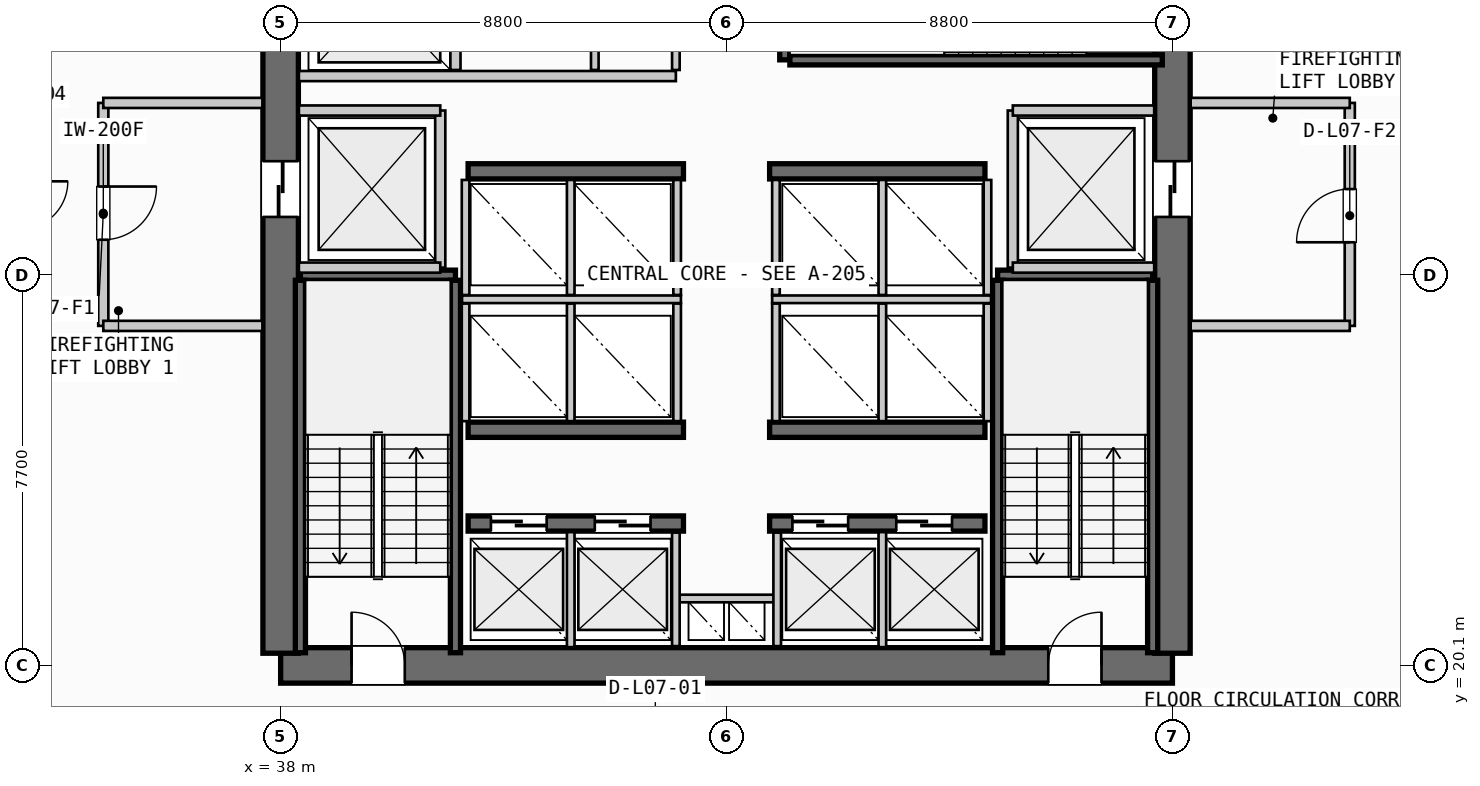
"""IFC4 building model, lengths in metres.
Left out: names, types, materials, properties, quantities, classifications, styles, units other than length and angle.
Written with IfcOpenShell. Run it as: python <this file> out.ifc"""

import sys

from ifc_helpers import new_model, si_unit, direction, frame, frame_2d, origin, place, context, subcontext, project, spatial, rectangle, extrude, source, transform, mapped, element, fill, save


model = new_model("IFC4")
c1 = context("Model", 3, precision=1e-05, world=origin(), true_north=direction((0.0, 1.0)))
c2 = subcontext(c1, "Body", "Model", "MODEL_VIEW")
j1 = project(units=[si_unit("LENGTHUNIT", "METRE"), si_unit("PLANEANGLEUNIT", "RADIAN")], contexts=[c1])
p1 = place(None, origin())
s1 = spatial("IfcSite", under=j1, at=p1, CompositionType="ELEMENT")
p2 = place(p1, origin())
s2 = spatial("IfcBuilding", under=s1, at=p2, CompositionType="ELEMENT")
p3 = place(p2, frame((0.0, 0.0, 33.4)))
s3 = spatial("IfcBuildingStorey", under=s2, at=p3, CompositionType="ELEMENT", Elevation=33.4)
p4 = place(p3, frame((38.0, 20.1, 0.0), z_axis=(0.0, 0.0, 1.0), x_axis=(1.0, 0.0, 0.0)))
e1 = element("IfcWall", 1, at=p4, inside=s3, PredefinedType="SHEAR", context=c2, shape_type="SweptSolid", body=[
    extrude(rectangle(XDim=17.6, YDim=0.7, at=frame_2d((8.8, 0.0))), origin(), (0.0, 0.0, 1.0), 3.55),
])
p5 = place(p4, frame((1.4, 0.0, 0.0)))
e2 = element("IfcOpeningElement", 2, at=p5, cuts=e1, PredefinedType="OPENING", context=c2, shape_type="SweptSolid", body=[
    extrude(rectangle(XDim=1.05, YDim=2.15, at=frame_2d((0.525, 1.075))), frame((0.0, 0.36, 0.0), z_axis=(0.0, -1.0, 0.0), x_axis=(1.0, 0.0, 0.0)), (0.0, 0.0, 1.0), 0.72),
])
p6 = place(p4, frame((15.15, 0.0, 0.0)))
e3 = element("IfcOpeningElement", 3, at=p6, cuts=e1, PredefinedType="OPENING", context=c2, shape_type="SweptSolid", body=[
    extrude(rectangle(XDim=1.05, YDim=2.15, at=frame_2d((0.525, 1.075))), frame((0.0, 0.36, 0.0), z_axis=(0.0, -1.0, 0.0), x_axis=(1.0, 0.0, 0.0)), (0.0, 0.0, 1.0), 0.72),
])
p7 = place(p3, frame((38.0, 35.26, 0.0), z_axis=(0.0, 0.0, 1.0), x_axis=(0.0, -1.0, 0.0)))
e4 = element("IfcWall", 4, at=p7, inside=s3, PredefinedType="SHEAR", context=c2, shape_type="SweptSolid", body=[
    extrude(rectangle(XDim=14.92, YDim=0.7, at=frame_2d((7.46, 0.0))), origin(), (0.0, 0.0, 1.0), 3.55),
])
p8 = place(p7, frame((5.21, 0.0, 0.0)))
e5 = element("IfcOpeningElement", 5, at=p8, cuts=e4, PredefinedType="OPENING", context=c2, shape_type="SweptSolid", body=[
    extrude(rectangle(XDim=1.1, YDim=2.2, at=frame_2d((0.55, 1.1))), frame((0.0, 0.36, 0.0), z_axis=(0.0, -1.0, 0.0), x_axis=(1.0, 0.0, 0.0)), (0.0, 0.0, 1.0), 0.72),
])
p9 = place(p3, frame((55.6, 20.34, 0.0), z_axis=(0.0, 0.0, 1.0), x_axis=(0.0, 1.0, 0.0)))
e6 = element("IfcWall", 6, at=p9, inside=s3, PredefinedType="SHEAR", context=c2, shape_type="SweptSolid", body=[
    extrude(rectangle(XDim=14.92, YDim=0.7, at=frame_2d((7.46, 0.0))), origin(), (0.0, 0.0, 1.0), 3.55),
])
p10 = place(p9, frame((12.71, 0.0, 0.0)))
e7 = element("IfcOpeningElement", 7, at=p10, cuts=e6, PredefinedType="OPENING", context=c2, shape_type="SweptSolid", body=[
    extrude(rectangle(XDim=1.05, YDim=2.15, at=frame_2d((0.525, 1.075))), frame((0.0, 0.36, 0.0), z_axis=(0.0, -1.0, 0.0), x_axis=(1.0, 0.0, 0.0)), (0.0, 0.0, 1.0), 0.72),
])
p11 = place(p9, frame((8.61, 0.0, 0.0)))
e8 = element("IfcOpeningElement", 8, at=p11, cuts=e6, PredefinedType="OPENING", context=c2, shape_type="SweptSolid", body=[
    extrude(rectangle(XDim=1.1, YDim=2.2, at=frame_2d((0.55, 1.1))), frame((0.0, 0.36, 0.0), z_axis=(0.0, -1.0, 0.0), x_axis=(1.0, 0.0, 0.0)), (0.0, 0.0, 1.0), 0.72),
])
p12 = place(p3, frame((41.7, 22.9, 0.0), z_axis=(0.0, 0.0, 1.0), x_axis=(1.0, 0.0, 0.0)))
e9 = element("IfcWall", 9, at=p12, inside=s3, PredefinedType="SHEAR", context=c2, shape_type="SweptSolid", body=[
    extrude(rectangle(XDim=4.25, YDim=0.3, at=frame_2d((2.125, 0.0))), origin(), (0.0, 0.0, 1.0), 3.55),
])
p13 = place(p12, frame((0.45, 0.0, 0.0)))
e10 = element("IfcOpeningElement", 10, at=p13, cuts=e9, PredefinedType="OPENING", context=c2, shape_type="SweptSolid", body=[
    extrude(rectangle(XDim=1.1, YDim=2.2, at=frame_2d((0.55, 1.1))), frame((0.0, 0.16, 0.0), z_axis=(0.0, -1.0, 0.0), x_axis=(1.0, 0.0, 0.0)), (0.0, 0.0, 1.0), 0.32),
])
p14 = place(p12, frame((2.5, 0.0, 0.0)))
e11 = element("IfcOpeningElement", 11, at=p14, cuts=e9, PredefinedType="OPENING", context=c2, shape_type="SweptSolid", body=[
    extrude(rectangle(XDim=1.1, YDim=2.2, at=frame_2d((0.55, 1.1))), frame((0.0, 0.16, 0.0), z_axis=(0.0, -1.0, 0.0), x_axis=(1.0, 0.0, 0.0)), (0.0, 0.0, 1.0), 0.32),
])
p15 = place(p3, frame((47.65, 22.9, 0.0), z_axis=(0.0, 0.0, 1.0), x_axis=(1.0, 0.0, 0.0)))
e12 = element("IfcWall", 12, at=p15, inside=s3, PredefinedType="SHEAR", context=c2, shape_type="SweptSolid", body=[
    extrude(rectangle(XDim=4.25, YDim=0.3, at=frame_2d((2.125, 0.0))), origin(), (0.0, 0.0, 1.0), 3.55),
])
p16 = place(p15, frame((0.45, 0.0, 0.0)))
e13 = element("IfcOpeningElement", 13, at=p16, cuts=e12, PredefinedType="OPENING", context=c2, shape_type="SweptSolid", body=[
    extrude(rectangle(XDim=1.1, YDim=2.2, at=frame_2d((0.55, 1.1))), frame((0.0, 0.16, 0.0), z_axis=(0.0, -1.0, 0.0), x_axis=(1.0, 0.0, 0.0)), (0.0, 0.0, 1.0), 0.32),
])
p17 = place(p15, frame((2.5, 0.0, 0.0)))
e14 = element("IfcOpeningElement", 14, at=p17, cuts=e12, PredefinedType="OPENING", context=c2, shape_type="SweptSolid", body=[
    extrude(rectangle(XDim=1.1, YDim=2.2, at=frame_2d((0.55, 1.1))), frame((0.0, 0.16, 0.0), z_axis=(0.0, -1.0, 0.0), x_axis=(1.0, 0.0, 0.0)), (0.0, 0.0, 1.0), 0.32),
])
for number, where, z_axis, x_axis in (
    (15, (41.7, 24.75, 0.0), (0.0, 0.0, 1.0), (1.0, 0.0, 0.0)),
    (16, (47.65, 24.75, 0.0), (0.0, 0.0, 1.0), (1.0, 0.0, 0.0)),
    (17, (41.7, 29.85, 0.0), (0.0, 0.0, 1.0), (1.0, 0.0, 0.0)),
    (18, (47.65, 29.85, 0.0), (0.0, 0.0, 1.0), (1.0, 0.0, 0.0)),
):
    element("IfcWall", number, at=place(p3, frame(where, z_axis=z_axis, x_axis=x_axis)), inside=s3, PredefinedType="SHEAR", context=c2, shape_type="SweptSolid", body=[
        extrude(rectangle(XDim=4.25, YDim=0.3, at=frame_2d((2.125, 0.0))), origin(), (0.0, 0.0, 1.0), 3.55),
    ])
p18 = place(p3, frame((38.39, 27.8, 0.0), z_axis=(0.0, 0.0, 1.0), x_axis=(1.0, 0.0, 0.0)))
e19 = element("IfcWall", 19, at=p18, inside=s3, PredefinedType="SHEAR", context=c2, shape_type="SweptSolid", body=[
    extrude(rectangle(XDim=3.06, YDim=0.2, at=frame_2d((1.53, 0.0))), origin(), (0.0, 0.0, 1.0), 3.55),
])
for number, where, z_axis, x_axis in (
    (20, (41.45, 27.7, 0.0), (0.0, 0.0, 1.0), (0.0, -1.0, 0.0)),
    (21, (38.39, 20.35, 0.0), (0.0, 0.0, 1.0), (0.0, 1.0, 0.0)),
):
    element("IfcWall", number, at=place(p3, frame(where, z_axis=z_axis, x_axis=x_axis)), inside=s3, PredefinedType="SHEAR", context=c2, shape_type="SweptSolid", body=[
        extrude(rectangle(XDim=7.35, YDim=0.2, at=frame_2d((3.675, 0.0))), origin(), (0.0, 0.0, 1.0), 3.55),
    ])
p19 = place(p3, frame((52.15, 27.8, 0.0), z_axis=(0.0, 0.0, 1.0), x_axis=(1.0, 0.0, 0.0)))
e22 = element("IfcWall", 22, at=p19, inside=s3, PredefinedType="SHEAR", context=c2, shape_type="SweptSolid", body=[
    extrude(rectangle(XDim=3.06, YDim=0.2, at=frame_2d((1.53, 0.0))), origin(), (0.0, 0.0, 1.0), 3.55),
])
for number, where, z_axis, x_axis in (
    (23, (55.21, 27.7, 0.0), (0.0, 0.0, 1.0), (0.0, -1.0, 0.0)),
    (24, (52.15, 20.35, 0.0), (0.0, 0.0, 1.0), (0.0, 1.0, 0.0)),
):
    element("IfcWall", number, at=place(p3, frame(where, z_axis=z_axis, x_axis=x_axis)), inside=s3, PredefinedType="SHEAR", context=c2, shape_type="SweptSolid", body=[
        extrude(rectangle(XDim=7.35, YDim=0.2, at=frame_2d((3.675, 0.0))), origin(), (0.0, 0.0, 1.0), 3.55),
    ])
p20 = place(p3, frame((47.95, 32.05, 0.0), z_axis=(0.0, 0.0, 1.0), x_axis=(0.0, 1.0, 0.0)))
e25 = element("IfcWall", 25, at=p20, inside=s3, PredefinedType="SHEAR", context=c2, shape_type="SweptSolid", body=[
    extrude(rectangle(XDim=3.06, YDim=0.2, at=frame_2d((1.53, 0.0))), origin(), (0.0, 0.0, 1.0), 3.55),
])
p21 = place(p3, frame((55.4, 32.05, 0.0), z_axis=(0.0, 0.0, 1.0), x_axis=(-1.0, 0.0, 0.0)))
e26 = element("IfcWall", 26, at=p21, inside=s3, PredefinedType="SHEAR", context=c2, shape_type="SweptSolid", body=[
    extrude(rectangle(XDim=7.35, YDim=0.2, at=frame_2d((3.675, 0.0))), origin(), (0.0, 0.0, 1.0), 3.55),
])
p22 = place(p3, frame((45.8, 21.42, 0.0), z_axis=(0.0, 0.0, 1.0), x_axis=(1.0, 0.0, 0.0)))
e27 = element("IfcWall", 27, at=p22, inside=s3, PredefinedType="PARTITIONING", context=c2, shape_type="SweptSolid", body=[
    extrude(rectangle(XDim=2.0, YDim=0.15, at=frame_2d((1.0, 0.0))), origin(), (0.0, 0.0, 1.0), 2.925),
])
for number, where, z_axis, x_axis in (
    (28, (45.8, 20.48, 0.0), (0.0, 0.0, 1.0), (0.0, 1.0, 0.0)),
    (29, (47.8, 20.48, 0.0), (0.0, 0.0, 1.0), (0.0, 1.0, 0.0)),
):
    element("IfcWall", number, at=place(p3, frame(where, z_axis=z_axis, x_axis=x_axis)), inside=s3, PredefinedType="PARTITIONING", context=c2, shape_type="SweptSolid", body=[
        extrude(rectangle(XDim=2.24, YDim=0.15, at=frame_2d((1.12, 0.0))), origin(), (0.0, 0.0, 1.0), 2.925),
    ])
p23 = place(p3, frame((41.15, 27.95, 0.0), z_axis=(0.0, 0.0, 1.0), x_axis=(0.0, 1.0, 0.0)))
e30 = element("IfcWall", 30, at=p23, inside=s3, PredefinedType="PARTITIONING", context=c2, shape_type="SweptSolid", body=[
    extrude(rectangle(XDim=3.1, YDim=0.2, at=frame_2d((1.55, 0.0))), origin(), (0.0, 0.0, 1.0), 2.925),
])
for number, where, z_axis, x_axis in (
    (31, (38.36, 27.95, 0.0), (0.0, 0.0, 1.0), (1.0, 0.0, 0.0)),
    (32, (38.36, 31.05, 0.0), (0.0, 0.0, 1.0), (1.0, 0.0, 0.0)),
):
    element("IfcWall", number, at=place(p3, frame(where, z_axis=z_axis, x_axis=x_axis)), inside=s3, PredefinedType="PARTITIONING", context=c2, shape_type="SweptSolid", body=[
        extrude(rectangle(XDim=2.79, YDim=0.2, at=frame_2d((1.395, 0.0))), origin(), (0.0, 0.0, 1.0), 2.925),
    ])
p24 = place(p3, frame((34.5, 31.2, 0.0), z_axis=(0.0, 0.0, 1.0), x_axis=(0.0, -1.0, 0.0)))
e33 = element("IfcWall", 33, at=p24, inside=s3, PredefinedType="PARTITIONING", context=c2, shape_type="SweptSolid", body=[
    extrude(rectangle(XDim=4.4, YDim=0.2, at=frame_2d((2.2, 0.0))), origin(), (0.0, 0.0, 1.0), 2.925),
])
p25 = place(p24, frame((1.65, 0.0, 0.0)))
e34 = element("IfcOpeningElement", 34, at=p25, cuts=e33, PredefinedType="OPENING", context=c2, shape_type="SweptSolid", body=[
    extrude(rectangle(XDim=1.05, YDim=2.15, at=frame_2d((0.525, 1.075))), frame((0.0, 0.11, 0.0), z_axis=(0.0, -1.0, 0.0), x_axis=(1.0, 0.0, 0.0)), (0.0, 0.0, 1.0), 0.22),
])
for number, where, z_axis, x_axis in (
    (35, (34.5, 26.8, 0.0), (0.0, 0.0, 1.0), (1.0, 0.0, 0.0)),
    (36, (34.5, 31.2, 0.0), (0.0, 0.0, 1.0), (1.0, 0.0, 0.0)),
):
    element("IfcWall", number, at=place(p3, frame(where, z_axis=z_axis, x_axis=x_axis)), inside=s3, PredefinedType="PARTITIONING", context=c2, shape_type="SweptSolid", body=[
        extrude(rectangle(XDim=3.14, YDim=0.2, at=frame_2d((1.57, 0.0))), origin(), (0.0, 0.0, 1.0), 2.925),
    ])
p26 = place(p3, frame((52.45, 27.95, 0.0), z_axis=(0.0, 0.0, 1.0), x_axis=(0.0, 1.0, 0.0)))
e37 = element("IfcWall", 37, at=p26, inside=s3, PredefinedType="PARTITIONING", context=c2, shape_type="SweptSolid", body=[
    extrude(rectangle(XDim=3.1, YDim=0.2, at=frame_2d((1.55, 0.0))), origin(), (0.0, 0.0, 1.0), 2.925),
])
for number, where, z_axis, x_axis in (
    (38, (52.45, 27.95, 0.0), (0.0, 0.0, 1.0), (1.0, 0.0, 0.0)),
    (39, (52.45, 31.05, 0.0), (0.0, 0.0, 1.0), (1.0, 0.0, 0.0)),
):
    element("IfcWall", number, at=place(p3, frame(where, z_axis=z_axis, x_axis=x_axis)), inside=s3, PredefinedType="PARTITIONING", context=c2, shape_type="SweptSolid", body=[
        extrude(rectangle(XDim=2.79, YDim=0.2, at=frame_2d((1.395, 0.0))), origin(), (0.0, 0.0, 1.0), 2.925),
    ])
p27 = place(p3, frame((59.1, 26.8, 0.0), z_axis=(0.0, 0.0, 1.0), x_axis=(0.0, 1.0, 0.0)))
e40 = element("IfcWall", 40, at=p27, inside=s3, PredefinedType="PARTITIONING", context=c2, shape_type="SweptSolid", body=[
    extrude(rectangle(XDim=4.4, YDim=0.2, at=frame_2d((2.2, 0.0))), origin(), (0.0, 0.0, 1.0), 2.925),
])
p28 = place(p27, frame((1.65, 0.0, 0.0)))
e41 = element("IfcOpeningElement", 41, at=p28, cuts=e40, PredefinedType="OPENING", context=c2, shape_type="SweptSolid", body=[
    extrude(rectangle(XDim=1.05, YDim=2.15, at=frame_2d((0.525, 1.075))), frame((0.0, 0.11, 0.0), z_axis=(0.0, -1.0, 0.0), x_axis=(1.0, 0.0, 0.0)), (0.0, 0.0, 1.0), 0.22),
])
for number, where, z_axis, x_axis in (
    (42, (55.96, 26.8, 0.0), (0.0, 0.0, 1.0), (1.0, 0.0, 0.0)),
    (43, (55.96, 31.2, 0.0), (0.0, 0.0, 1.0), (1.0, 0.0, 0.0)),
):
    element("IfcWall", number, at=place(p3, frame(where, z_axis=z_axis, x_axis=x_axis)), inside=s3, PredefinedType="PARTITIONING", context=c2, shape_type="SweptSolid", body=[
        extrude(rectangle(XDim=3.14, YDim=0.2, at=frame_2d((1.57, 0.0))), origin(), (0.0, 0.0, 1.0), 2.925),
    ])
for number, where, z_axis, x_axis in (
    (44, (43.725, 20.46, 0.0), (0.0, 0.0, 1.0), (0.0, 1.0, 0.0)),
    (45, (49.875, 20.46, 0.0), (0.0, 0.0, 1.0), (0.0, 1.0, 0.0)),
):
    element("IfcWall", number, at=place(p3, frame(where, z_axis=z_axis, x_axis=x_axis)), inside=s3, PredefinedType="PARTITIONING", context=c2, shape_type="SweptSolid", body=[
        extrude(rectangle(XDim=2.27, YDim=0.15, at=frame_2d((1.135, 0.0))), origin(), (0.0, 0.0, 1.0), 2.925),
    ])
p29 = place(p3, frame((41.58, 27.325, 0.0), z_axis=(0.0, 0.0, 1.0), x_axis=(1.0, 0.0, 0.0)))
e46 = element("IfcWall", 46, at=p29, inside=s3, PredefinedType="PARTITIONING", context=c2, shape_type="SweptSolid", body=[
    extrude(rectangle(XDim=4.32, YDim=0.15, at=frame_2d((2.16, 0.0))), origin(), (0.0, 0.0, 1.0), 2.925),
])
p30 = place(p3, frame((47.7, 27.325, 0.0), z_axis=(0.0, 0.0, 1.0), x_axis=(1.0, 0.0, 0.0)))
e47 = element("IfcWall", 47, at=p30, inside=s3, PredefinedType="PARTITIONING", context=c2, shape_type="SweptSolid", body=[
    extrude(rectangle(XDim=4.32, YDim=0.15, at=frame_2d((2.16, 0.0))), origin(), (0.0, 0.0, 1.0), 2.925),
])
for number, where, z_axis, x_axis in (
    (48, (41.65, 24.92, 0.0), (0.0, 0.0, 1.0), (0.0, 1.0, 0.0)),
    (49, (43.725, 24.92, 0.0), (0.0, 0.0, 1.0), (0.0, 1.0, 0.0)),
    (50, (45.825, 24.92, 0.0), (0.0, 0.0, 1.0), (0.0, 1.0, 0.0)),
    (51, (47.775, 24.92, 0.0), (0.0, 0.0, 1.0), (0.0, 1.0, 0.0)),
    (52, (49.875, 24.92, 0.0), (0.0, 0.0, 1.0), (0.0, 1.0, 0.0)),
    (53, (51.95, 24.92, 0.0), (0.0, 0.0, 1.0), (0.0, 1.0, 0.0)),
):
    element("IfcWall", number, at=place(p3, frame(where, z_axis=z_axis, x_axis=x_axis)), inside=s3, PredefinedType="PARTITIONING", context=c2, shape_type="SweptSolid", body=[
        extrude(rectangle(XDim=2.32, YDim=0.15, at=frame_2d((1.16, 0.0))), origin(), (0.0, 0.0, 1.0), 2.925),
    ])
for number, where, z_axis, x_axis in (
    (54, (41.65, 27.41, 0.0), (0.0, 0.0, 1.0), (0.0, 1.0, 0.0)),
    (55, (43.725, 27.41, 0.0), (0.0, 0.0, 1.0), (0.0, 1.0, 0.0)),
    (56, (45.825, 27.41, 0.0), (0.0, 0.0, 1.0), (0.0, 1.0, 0.0)),
    (57, (47.775, 27.41, 0.0), (0.0, 0.0, 1.0), (0.0, 1.0, 0.0)),
    (58, (49.875, 27.41, 0.0), (0.0, 0.0, 1.0), (0.0, 1.0, 0.0)),
    (59, (51.95, 27.41, 0.0), (0.0, 0.0, 1.0), (0.0, 1.0, 0.0)),
):
    element("IfcWall", number, at=place(p3, frame(where, z_axis=z_axis, x_axis=x_axis)), inside=s3, PredefinedType="PARTITIONING", context=c2, shape_type="SweptSolid", body=[
        extrude(rectangle(XDim=2.27, YDim=0.15, at=frame_2d((1.135, 0.0))), origin(), (0.0, 0.0, 1.0), 2.925),
    ])
p31 = place(p3, frame((41.45, 31.85, 0.0), z_axis=(0.0, 0.0, 1.0), x_axis=(0.0, 1.0, 0.0)))
e60 = element("IfcWall", 60, at=p31, inside=s3, PredefinedType="PARTITIONING", context=c2, shape_type="SweptSolid", body=[
    extrude(rectangle(XDim=3.29, YDim=0.2, at=frame_2d((1.645, 0.0))), origin(), (0.0, 0.0, 1.0), 2.925),
])
p32 = place(p3, frame((38.36, 31.73, 0.0), z_axis=(0.0, 0.0, 1.0), x_axis=(1.0, 0.0, 0.0)))
e61 = element("IfcWall", 61, at=p32, inside=s3, PredefinedType="PARTITIONING", context=c2, shape_type="SweptSolid", body=[
    extrude(rectangle(XDim=7.44, YDim=0.2, at=frame_2d((3.72, 0.0))), origin(), (0.0, 0.0, 1.0), 2.925),
])
p33 = place(p3, frame((45.8, 31.85, 0.0), z_axis=(0.0, 0.0, 1.0), x_axis=(0.0, 1.0, 0.0)))
e62 = element("IfcWall", 62, at=p33, inside=s3, PredefinedType="PARTITIONING", context=c2, shape_type="SweptSolid", body=[
    extrude(rectangle(XDim=3.29, YDim=0.15, at=frame_2d((1.645, 0.0))), origin(), (0.0, 0.0, 1.0), 2.925),
])
p34 = place(p3, frame((44.2, 31.85, 0.0), z_axis=(0.0, 0.0, 1.0), x_axis=(0.0, 1.0, 0.0)))
e63 = element("IfcWall", 63, at=p34, inside=s3, PredefinedType="PLUMBINGWALL", context=c2, shape_type="SweptSolid", body=[
    extrude(rectangle(XDim=3.29, YDim=0.15, at=frame_2d((1.645, 0.0))), origin(), (0.0, 0.0, 1.0), 2.925),
])
m1 = source(origin(), c2, "Body", "SweptSolid", [
    extrude(rectangle(XDim=1.05, YDim=2.15, at=frame_2d((0.525, 1.075))), frame((0.0, 0.025, 0.0), z_axis=(0.0, -1.0, 0.0), x_axis=(1.0, 0.0, 0.0)), (0.0, 0.0, 1.0), 0.05),
])
p35 = place(p5, origin())
e64 = element("IfcDoor", 64, at=p35, inside=s3, OperationType="SINGLE_SWING_LEFT", PredefinedType="DOOR", context=c2, shape_type="MappedRepresentation", body=[
    mapped(m1, transform((0.0, 0.0, 0.0), scale=1.0)),
])
fill(e2, e64)
p36 = place(p6, origin())
e65 = element("IfcDoor", 65, at=p36, inside=s3, OperationType="SINGLE_SWING_RIGHT", PredefinedType="DOOR", context=c2, shape_type="MappedRepresentation", body=[
    mapped(m1, transform((0.0, 0.0, 0.0), scale=1.0)),
])
fill(e3, e65)
m2 = source(origin(), c2, "Body", "SweptSolid", [
    extrude(rectangle(XDim=1.1, YDim=2.2, at=frame_2d((0.55, 1.1))), frame((0.0, 0.025, 0.0), z_axis=(0.0, -1.0, 0.0), x_axis=(1.0, 0.0, 0.0)), (0.0, 0.0, 1.0), 0.05),
])
p37 = place(p8, origin())
e66 = element("IfcDoor", 66, at=p37, inside=s3, OperationType="SLIDING_TO_LEFT", PredefinedType="DOOR", context=c2, shape_type="MappedRepresentation", body=[
    mapped(m2, transform((0.0, 0.0, 0.0), scale=1.0)),
])
fill(e5, e66)
p38 = place(p11, origin())
e67 = element("IfcDoor", 67, at=p38, inside=s3, OperationType="SLIDING_TO_RIGHT", PredefinedType="DOOR", context=c2, shape_type="MappedRepresentation", body=[
    mapped(m2, transform((0.0, 0.0, 0.0), scale=1.0)),
])
fill(e8, e67)
p39 = place(p13, origin())
e68 = element("IfcDoor", 68, at=p39, inside=s3, OperationType="SLIDING_TO_LEFT", PredefinedType="DOOR", context=c2, shape_type="MappedRepresentation", body=[
    mapped(m2, transform((0.0, 0.0, 0.0), scale=1.0)),
])
fill(e10, e68)
p40 = place(p14, origin())
e69 = element("IfcDoor", 69, at=p40, inside=s3, OperationType="SLIDING_TO_LEFT", PredefinedType="DOOR", context=c2, shape_type="MappedRepresentation", body=[
    mapped(m2, transform((0.0, 0.0, 0.0), scale=1.0)),
])
fill(e11, e69)
p41 = place(p16, origin())
e70 = element("IfcDoor", 70, at=p41, inside=s3, OperationType="SLIDING_TO_LEFT", PredefinedType="DOOR", context=c2, shape_type="MappedRepresentation", body=[
    mapped(m2, transform((0.0, 0.0, 0.0), scale=1.0)),
])
fill(e13, e70)
p42 = place(p17, origin())
e71 = element("IfcDoor", 71, at=p42, inside=s3, OperationType="SLIDING_TO_LEFT", PredefinedType="DOOR", context=c2, shape_type="MappedRepresentation", body=[
    mapped(m2, transform((0.0, 0.0, 0.0), scale=1.0)),
])
fill(e14, e71)
p43 = place(p25, origin())
e72 = element("IfcDoor", 72, at=p43, inside=s3, OperationType="SINGLE_SWING_LEFT", PredefinedType="DOOR", context=c2, shape_type="MappedRepresentation", body=[
    mapped(m1, transform((0.0, 0.0, 0.0), scale=1.0)),
])
fill(e34, e72)
p44 = place(p28, origin())
e73 = element("IfcDoor", 73, at=p44, inside=s3, OperationType="SINGLE_SWING_LEFT", PredefinedType="DOOR", context=c2, shape_type="MappedRepresentation", body=[
    mapped(m1, transform((0.0, 0.0, 0.0), scale=1.0)),
])
fill(e41, e73)
save(model, sys.argv[1])
